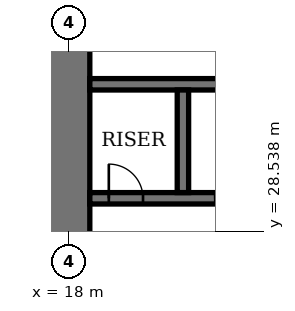
"""IFC4 building model, lengths in metres.
Left out: names, types, materials, properties, quantities, classifications, styles, units other than length and angle.
Written with IfcOpenShell. Run it as: python <this file> out.ifc"""

import sys

from ifc_helpers import new_model, si_unit, direction, frame, frame_2d, origin, place, context, subcontext, project, spatial, rectangle, extrude, element, fill, save


model = new_model("IFC4")
c1 = context("Model", 3, precision=1e-05, world=origin(), true_north=direction((0.0, 1.0)))
c2 = subcontext(c1, "Body", "Model", "MODEL_VIEW")
j1 = project(units=[si_unit("LENGTHUNIT", "METRE"), si_unit("PLANEANGLEUNIT", "RADIAN")], contexts=[c1])
p1 = place(None, origin())
s1 = spatial("IfcSite", under=j1, at=p1, CompositionType="ELEMENT")
p2 = place(p1, origin())
s2 = spatial("IfcBuilding", under=s1, at=p2, CompositionType="ELEMENT")
p3 = place(p2, frame((0.0, 0.0, 243.4)))
s3 = spatial("IfcBuildingStorey", under=s2, at=p3, CompositionType="ELEMENT", Elevation=243.4)
p4 = place(p3, frame((18.0, 35.45, 0.0), z_axis=(0.0, 0.0, 1.0), x_axis=(0.0, -1.0, 0.0)))
e1 = element("IfcWall", 1, at=p4, inside=s3, PredefinedType="SHEAR", context=c2, shape_type="SweptSolid", body=[
    extrude(rectangle(XDim=16.9, YDim=1.1, at=frame_2d((8.45, 0.0))), origin(), (0.0, 0.0, 1.0), 4.0),
])
p5 = place(p4, frame((8.45, 0.0, 0.0)))
e2 = element("IfcOpeningElement", 2, at=p5, cuts=e1, PredefinedType="OPENING", context=c2, shape_type="SweptSolid", body=[
    extrude(rectangle(XDim=1.8, YDim=2.4, at=frame_2d((0.9, 1.2))), frame((0.0, 0.56, 0.0), z_axis=(0.0, -1.0, 0.0), x_axis=(1.0, 0.0, 0.0)), (0.0, 0.0, 1.0), 1.12),
])
p6 = place(p3, frame((18.55, 29.4, 0.0), z_axis=(0.0, 0.0, 1.0), x_axis=(1.0, 0.0, 0.0)))
e3 = element("IfcWall", 3, at=p6, inside=s3, PredefinedType="SHEAR", context=c2, shape_type="SweptSolid", body=[
    extrude(rectangle(XDim=25.9, YDim=0.3, at=frame_2d((12.95, 0.0))), origin(), (0.0, 0.0, 1.0), 4.0),
])
p7 = place(p6, frame((19.95, 0.0, 0.0)))
e4 = element("IfcOpeningElement", 4, at=p7, cuts=e3, PredefinedType="OPENING", context=c2, shape_type="SweptSolid", body=[
    extrude(rectangle(XDim=1.0, YDim=2.4, at=frame_2d((0.5, 1.2))), frame((0.0, 0.16, 0.0), z_axis=(0.0, -1.0, 0.0), x_axis=(1.0, 0.0, 0.0)), (0.0, 0.0, 1.0), 0.32),
])
p8 = place(p6, frame((0.5, 0.0, 0.0)))
e5 = element("IfcOpeningElement", 5, at=p8, cuts=e3, PredefinedType="OPENING", context=c2, shape_type="SweptSolid", body=[
    extrude(rectangle(XDim=0.9, YDim=2.1, at=frame_2d((0.45, 1.05))), frame((0.0, 0.16, 0.0), z_axis=(0.0, -1.0, 0.0), x_axis=(1.0, 0.0, 0.0)), (0.0, 0.0, 1.0), 0.32),
])
p9 = place(p6, frame((15.45, 0.0, 0.0)))
e6 = element("IfcOpeningElement", 6, at=p9, cuts=e3, PredefinedType="OPENING", context=c2, shape_type="SweptSolid", body=[
    extrude(rectangle(XDim=1.0, YDim=2.4, at=frame_2d((0.5, 1.2))), frame((0.0, 0.16, 0.0), z_axis=(0.0, -1.0, 0.0), x_axis=(1.0, 0.0, 0.0)), (0.0, 0.0, 1.0), 0.32),
])
p10 = place(p6, frame((12.45, 0.0, 0.0)))
e7 = element("IfcOpeningElement", 7, at=p10, cuts=e3, PredefinedType="OPENING", context=c2, shape_type="SweptSolid", body=[
    extrude(rectangle(XDim=1.0, YDim=2.4, at=frame_2d((0.5, 1.2))), frame((0.0, 0.16, 0.0), z_axis=(0.0, -1.0, 0.0), x_axis=(1.0, 0.0, 0.0)), (0.0, 0.0, 1.0), 0.32),
])
p11 = place(p6, frame((9.45, 0.0, 0.0)))
e8 = element("IfcOpeningElement", 8, at=p11, cuts=e3, PredefinedType="OPENING", context=c2, shape_type="SweptSolid", body=[
    extrude(rectangle(XDim=1.0, YDim=2.4, at=frame_2d((0.5, 1.2))), frame((0.0, 0.16, 0.0), z_axis=(0.0, -1.0, 0.0), x_axis=(1.0, 0.0, 0.0)), (0.0, 0.0, 1.0), 0.32),
])
p12 = place(p6, frame((6.45, 0.0, 0.0)))
e9 = element("IfcOpeningElement", 9, at=p12, cuts=e3, PredefinedType="OPENING", context=c2, shape_type="SweptSolid", body=[
    extrude(rectangle(XDim=1.0, YDim=2.4, at=frame_2d((0.5, 1.2))), frame((0.0, 0.16, 0.0), z_axis=(0.0, -1.0, 0.0), x_axis=(1.0, 0.0, 0.0)), (0.0, 0.0, 1.0), 0.32),
])
p13 = place(p6, frame((3.3, 0.0, 0.0)))
e10 = element("IfcOpeningElement", 10, at=p13, cuts=e3, PredefinedType="OPENING", context=c2, shape_type="SweptSolid", body=[
    extrude(rectangle(XDim=1.3, YDim=2.4, at=frame_2d((0.65, 1.2))), frame((0.0, 0.16, 0.0), z_axis=(0.0, -1.0, 0.0), x_axis=(1.0, 0.0, 0.0)), (0.0, 0.0, 1.0), 0.32),
])
p14 = place(p3, frame((18.55, 32.4, 0.0), z_axis=(0.0, 0.0, 1.0), x_axis=(1.0, 0.0, 0.0)))
e11 = element("IfcWall", 11, at=p14, inside=s3, PredefinedType="SHEAR", context=c2, shape_type="SweptSolid", body=[
    extrude(rectangle(XDim=17.3, YDim=0.3, at=frame_2d((8.65, 0.0))), origin(), (0.0, 0.0, 1.0), 4.0),
])
p15 = place(p3, frame((21.0, 29.55, 0.0), z_axis=(0.0, 0.0, 1.0), x_axis=(0.0, 1.0, 0.0)))
e12 = element("IfcWall", 12, at=p15, inside=s3, PredefinedType="SHEAR", context=c2, shape_type="SweptSolid", body=[
    extrude(rectangle(XDim=2.7, YDim=0.3, at=frame_2d((1.35, 0.0))), origin(), (0.0, 0.0, 1.0), 4.0),
])
p16 = place(p8, origin())
e13 = element("IfcDoor", 13, at=p16, inside=s3, OperationType="SINGLE_SWING_RIGHT", PredefinedType="DOOR", context=c2, shape_type="SweptSolid", body=[
    extrude(rectangle(XDim=0.9, YDim=2.1, at=frame_2d((0.45, 1.05))), frame((0.0, 0.03, 0.0), z_axis=(0.0, -1.0, 0.0), x_axis=(1.0, 0.0, 0.0)), (0.0, 0.0, 1.0), 0.06),
])
fill(e5, e13)
p17 = place(p13, origin())
e14 = element("IfcDoor", 14, at=p17, inside=s3, OperationType="DOUBLE_DOOR_SLIDING", PredefinedType="DOOR", context=c2, shape_type="SweptSolid", body=[
    extrude(rectangle(XDim=1.3, YDim=2.4, at=frame_2d((0.65, 1.2))), frame((0.0, 0.02, 0.0), z_axis=(0.0, -1.0, 0.0), x_axis=(1.0, 0.0, 0.0)), (0.0, 0.0, 1.0), 0.04),
])
fill(e10, e14)
save(model, sys.argv[1])
